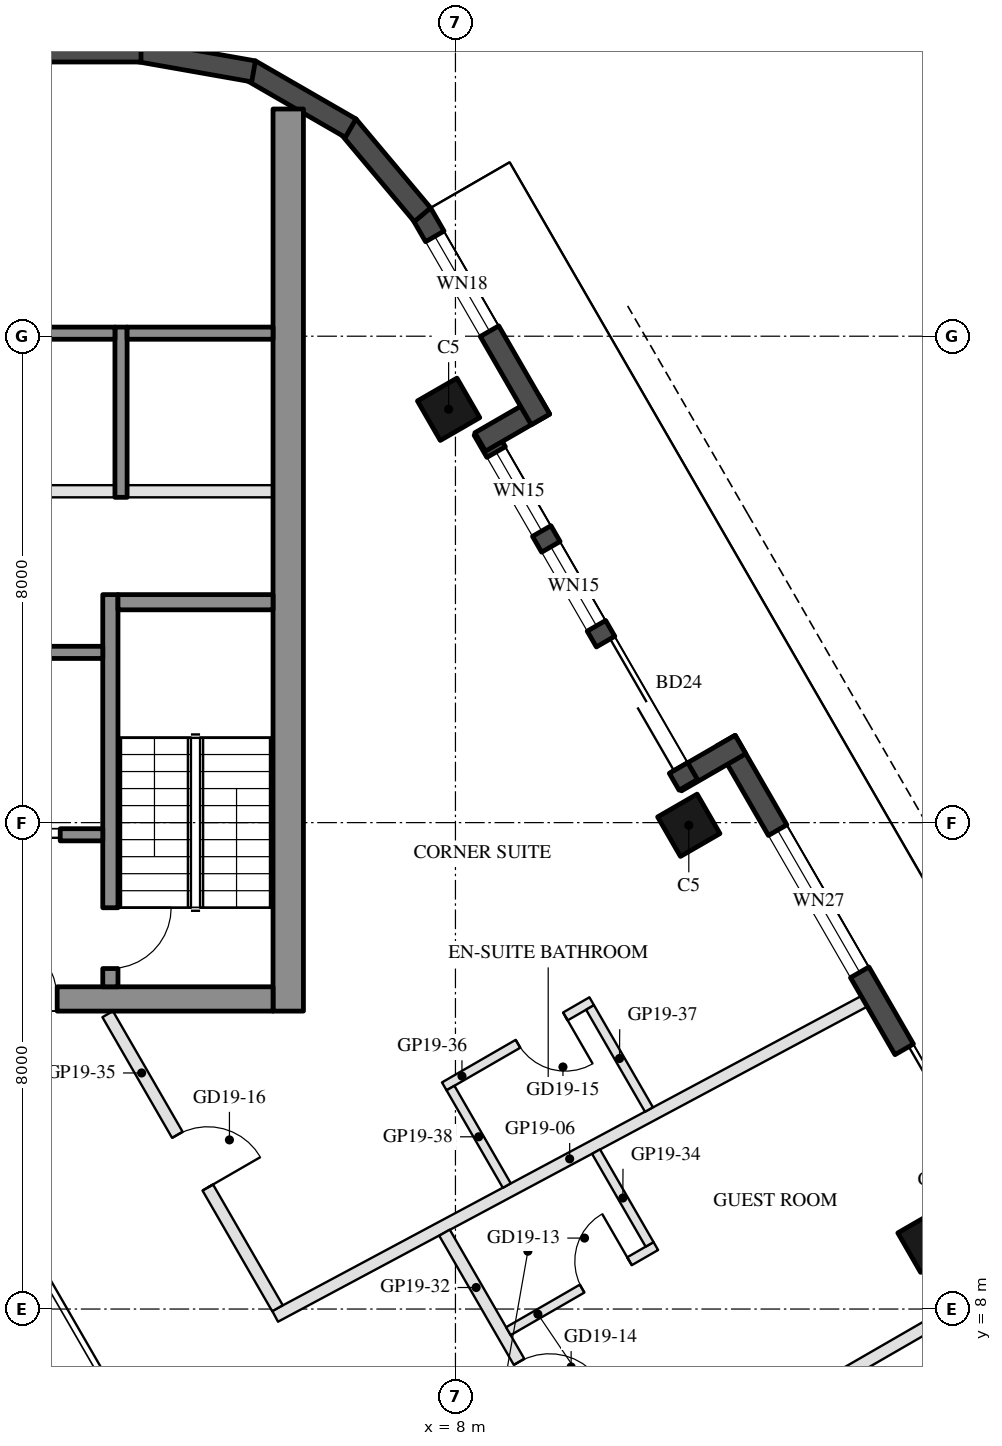
"""IFC4 building model, lengths in metres.
Left out: names, types, materials, properties, quantities, classifications, styles, units other than length and angle.
Written with IfcOpenShell. Run it as: python <this file> out.ifc"""

import sys

from ifc_helpers import new_model, si_unit, direction, frame, frame_2d, origin, origin_2d, place, context, subcontext, project, spatial, rectangle, hollow_rectangle, extrude, element, fill, save


model = new_model("IFC4")
c1 = context("Model", 3, precision=1e-05, world=origin(), true_north=direction((0.0, 1.0)))
c2 = subcontext(c1, "Body", "Model", "MODEL_VIEW")
j1 = project(units=[si_unit("LENGTHUNIT", "METRE"), si_unit("PLANEANGLEUNIT", "RADIAN")], contexts=[c1])
p1 = place(None, origin())
s1 = spatial("IfcSite", under=j1, at=p1, CompositionType="ELEMENT")
p2 = place(p1, origin())
s2 = spatial("IfcBuilding", under=s1, at=p2, CompositionType="ELEMENT")
p3 = place(p2, frame((0.0, 0.0, 202.1)))
s3 = spatial("IfcBuildingStorey", under=s2, at=p3, CompositionType="ELEMENT", Elevation=202.1)
for number, where, z_axis, x_axis in (
    (1, (15.788, 9.115, 0.0), (0.0, 0.0, 1.0), (-0.5, 0.866, 0.0)),
    (2, (11.838, 15.957, 0.0), (0.0, 0.0, 1.0), (-0.5, 0.866, 0.0)),
    (3, (7.888, 22.798, 0.0), (0.0, 0.0, 1.0), (-0.5, 0.866, 0.0)),
):
    element("IfcColumn", number, at=place(p3, frame(where, z_axis=z_axis, x_axis=x_axis)), inside=s3, PredefinedType="COLUMN", context=c2, shape_type="SweptSolid", body=[
        extrude(hollow_rectangle(XDim=0.75, YDim=0.75, WallThickness=0.035, at=origin_2d()), origin(), (0.0, 0.0, 1.0), 3.7),
    ])
p4 = place(p3, frame((17.299, 8.948, 0.0), z_axis=(0.0, 0.0, 1.0), x_axis=(-0.500010041276, 0.866019606374, 0.0)))
e4 = element("IfcWall", 4, at=p4, inside=s3, PredefinedType="SOLIDWALL", context=c2, shape_type="SweptSolid", body=[
    extrude(rectangle(XDim=9.7, YDim=0.35, at=frame_2d((4.85, 0.0))), origin(), (0.0, 0.0, 1.0), 3.55),
])
p5 = place(p4, frame((2.037, 0.0, 0.0)))
e5 = element("IfcOpeningElement", 5, at=p5, cuts=e4, PredefinedType="OPENING", context=c2, shape_type="SweptSolid", body=[
    extrude(rectangle(XDim=1.8, YDim=2.4, at=frame_2d((0.9, 1.2))), frame((0.0, 0.185, 0.0), z_axis=(0.0, -1.0, 0.0), x_axis=(1.0, 0.0, 0.0)), (0.0, 0.0, 1.0), 0.37),
])
p6 = place(p4, frame((5.3, 0.0, 0.3)))
e6 = element("IfcOpeningElement", 6, at=p6, cuts=e4, PredefinedType="OPENING", context=c2, shape_type="SweptSolid", body=[
    extrude(rectangle(XDim=2.7, YDim=2.65, at=frame_2d((1.35, 1.325))), frame((0.0, 0.185, 0.0), z_axis=(0.0, -1.0, 0.0), x_axis=(1.0, 0.0, 0.0)), (0.0, 0.0, 1.0), 0.37),
])
p7 = place(p3, frame((12.688, 17.284, 0.0), z_axis=(0.0, 0.0, 1.0), x_axis=(-0.865955602162, -0.500120880472, 0.0)))
e7 = element("IfcWall", 7, at=p7, inside=s3, PredefinedType="SOLIDWALL", context=c2, shape_type="SweptSolid", body=[
    extrude(rectangle(XDim=1.22, YDim=0.35, at=frame_2d((0.61, 0.0))), origin(), (0.0, 0.0, 1.0), 3.55),
])
p8 = place(p3, frame((11.829, 16.621, 0.0), z_axis=(0.0, 0.0, 1.0), x_axis=(-0.500003597184, 0.866023326939, 0.0)))
e8 = element("IfcWall", 8, at=p8, inside=s3, PredefinedType="SOLIDWALL", context=c2, shape_type="SweptSolid", body=[
    extrude(rectangle(XDim=6.74, YDim=0.35, at=frame_2d((3.37, 0.0))), origin(), (0.0, 0.0, 1.0), 3.55),
])
p9 = place(p8, frame((0.32, 0.0, 0.0)))
e9 = element("IfcOpeningElement", 9, at=p9, cuts=e8, PredefinedType="OPENING", context=c2, shape_type="SweptSolid", body=[
    extrude(rectangle(XDim=2.4, YDim=2.4, at=frame_2d((1.2, 1.2))), frame((0.0, 0.185, 0.0), z_axis=(0.0, -1.0, 0.0), x_axis=(1.0, 0.0, 0.0)), (0.0, 0.0, 1.0), 0.37),
])
p10 = place(p8, frame((3.02, 0.0, 0.3)))
e10 = element("IfcOpeningElement", 10, at=p10, cuts=e8, PredefinedType="OPENING", context=c2, shape_type="SweptSolid", body=[
    extrude(rectangle(XDim=1.5, YDim=2.65, at=frame_2d((0.75, 1.325))), frame((0.0, 0.185, 0.0), z_axis=(0.0, -1.0, 0.0), x_axis=(1.0, 0.0, 0.0)), (0.0, 0.0, 1.0), 0.37),
])
p11 = place(p8, frame((4.82, 0.0, 0.3)))
e11 = element("IfcOpeningElement", 11, at=p11, cuts=e8, PredefinedType="OPENING", context=c2, shape_type="SweptSolid", body=[
    extrude(rectangle(XDim=1.5, YDim=2.65, at=frame_2d((0.75, 1.325))), frame((0.0, 0.185, 0.0), z_axis=(0.0, -1.0, 0.0), x_axis=(1.0, 0.0, 0.0)), (0.0, 0.0, 1.0), 0.37),
])
p12 = place(p3, frame((8.406, 22.26, 0.0), z_axis=(0.0, 0.0, 1.0), x_axis=(0.865955602162, 0.500120880472, 0.0)))
e12 = element("IfcWall", 12, at=p12, inside=s3, PredefinedType="SOLIDWALL", context=c2, shape_type="SweptSolid", body=[
    extrude(rectangle(XDim=1.22, YDim=0.35, at=frame_2d((0.61, 0.0))), origin(), (0.0, 0.0, 1.0), 3.55),
])
p13 = place(p3, frame((9.398, 22.631, 0.0), z_axis=(0.0, 0.0, 1.0), x_axis=(-0.499954521343, 0.866051659307, 0.0)))
e13 = element("IfcWall", 13, at=p13, inside=s3, PredefinedType="SOLIDWALL", context=c2, shape_type="SweptSolid", body=[
    extrude(rectangle(XDim=3.916, YDim=0.35, at=frame_2d((1.958, 0.0))), origin(), (0.0, 0.0, 1.0), 3.55),
])
p14 = place(p13, frame((1.676, 0.0, 0.3)))
e14 = element("IfcOpeningElement", 14, at=p14, cuts=e13, PredefinedType="OPENING", context=c2, shape_type="SweptSolid", body=[
    extrude(rectangle(XDim=1.8, YDim=2.65, at=frame_2d((0.9, 1.325))), frame((0.0, 0.185, 0.0), z_axis=(0.0, -1.0, 0.0), x_axis=(1.0, 0.0, 0.0)), (0.0, 0.0, 1.0), 0.37),
])
p15 = place(p3, frame((7.458, 25.998, 0.0), z_axis=(0.0, 0.0, 1.0), x_axis=(-0.642808304945, 0.766027077259, 0.0)))
e15 = element("IfcWall", 15, at=p15, inside=s3, PredefinedType="SOLIDWALL", context=c2, shape_type="SweptSolid", body=[
    extrude(rectangle(XDim=1.91, YDim=0.35, at=frame_2d((0.955, 0.0))), origin(), (0.0, 0.0, 1.0), 3.55),
])
for number, where, z_axis, x_axis in (
    (16, (6.277, 27.422, 0.0), (0.0, 0.0, 1.0), (-0.866, 0.5, 0.0)),
    (17, (4.68, 28.356, 0.0), (0.0, 0.0, 1.0), (-0.985, 0.174, 0.0)),
):
    element("IfcWall", number, at=place(p3, frame(where, z_axis=z_axis, x_axis=x_axis)), inside=s3, PredefinedType="SOLIDWALL", context=c2, shape_type="SweptSolid", body=[
        extrude(rectangle(XDim=1.91, YDim=0.35, at=frame_2d((0.955, 0.0))), origin(), (0.0, 0.0, 1.0), 3.55),
    ])
p16 = place(p3, frame((2.829, 28.685, 0.0), z_axis=(0.0, 0.0, 1.0), x_axis=(-1.0, 0.0, 0.0)))
e18 = element("IfcWall", 18, at=p16, inside=s3, PredefinedType="SOLIDWALL", context=c2, shape_type="SweptSolid", body=[
    extrude(rectangle(XDim=5.658, YDim=0.35, at=frame_2d((2.829, 0.0))), origin(), (0.0, 0.0, 1.0), 3.55),
])
p17 = place(p3, frame((5.25, 12.9, 0.0), z_axis=(0.0, 0.0, 1.0), x_axis=(0.0, 1.0, 0.0)))
e19 = element("IfcWall", 19, at=p17, inside=s3, PredefinedType="SHEAR", context=c2, shape_type="SweptSolid", body=[
    extrude(rectangle(XDim=14.837, YDim=0.5, at=frame_2d((7.418, 0.0))), origin(), (0.0, 0.0, 1.0), 3.5),
])
p18 = place(p3, frame((5.0, 13.1, 0.0), z_axis=(0.0, 0.0, 1.0), x_axis=(-1.0, 0.0, 0.0)))
e20 = element("IfcWall", 20, at=p18, inside=s3, PredefinedType="SHEAR", context=c2, shape_type="SweptSolid", body=[
    extrude(rectangle(XDim=10.0, YDim=0.4, at=frame_2d((5.0, 0.0))), origin(), (0.0, 0.0, 1.0), 3.5),
])
p19 = place(p18, frame((3.55, 0.0, 0.0)))
e21 = element("IfcOpeningElement", 21, at=p19, cuts=e20, PredefinedType="OPENING", context=c2, shape_type="SweptSolid", body=[
    extrude(rectangle(XDim=1.1, YDim=2.1, at=frame_2d((0.55, 1.05))), frame((0.0, 0.21, 0.0), z_axis=(0.0, -1.0, 0.0), x_axis=(1.0, 0.0, 0.0)), (0.0, 0.0, 1.0), 0.42),
])
p20 = place(p18, frame((5.85, 0.0, 0.0)))
e22 = element("IfcOpeningElement", 22, at=p20, cuts=e20, PredefinedType="OPENING", context=c2, shape_type="SweptSolid", body=[
    extrude(rectangle(XDim=1.4, YDim=2.1, at=frame_2d((0.7, 1.05))), frame((0.0, 0.21, 0.0), z_axis=(0.0, -1.0, 0.0), x_axis=(1.0, 0.0, 0.0)), (0.0, 0.0, 1.0), 0.42),
])
p21 = place(p3, frame((2.325, 13.3, 0.0), z_axis=(0.0, 0.0, 1.0), x_axis=(0.0, 1.0, 0.0)))
e23 = element("IfcWall", 23, at=p21, inside=s3, PredefinedType="SHEAR", context=c2, shape_type="SweptSolid", body=[
    extrude(rectangle(XDim=6.45, YDim=0.25, at=frame_2d((3.225, 0.0))), origin(), (0.0, 0.0, 1.0), 3.5),
])
p22 = place(p21, frame((0.3, 0.0, 0.0)))
e24 = element("IfcOpeningElement", 24, at=p22, cuts=e23, PredefinedType="OPENING", context=c2, shape_type="SweptSolid", body=[
    extrude(rectangle(XDim=1.0, YDim=2.1, at=frame_2d((0.5, 1.05))), frame((0.0, 0.135, 0.0), z_axis=(0.0, -1.0, 0.0), x_axis=(1.0, 0.0, 0.0)), (0.0, 0.0, 1.0), 0.27),
])
p23 = place(p3, frame((5.0, 19.625, 0.0), z_axis=(0.0, 0.0, 1.0), x_axis=(-1.0, 0.0, 0.0)))
e25 = element("IfcWall", 25, at=p23, inside=s3, PredefinedType="SHEAR", context=c2, shape_type="SweptSolid", body=[
    extrude(rectangle(XDim=2.55, YDim=0.25, at=frame_2d((1.275, 0.0))), origin(), (0.0, 0.0, 1.0), 3.5),
])
p24 = place(p3, frame((2.2, 18.8, 0.0), z_axis=(0.0, 0.0, 1.0), x_axis=(-1.0, 0.0, 0.0)))
e26 = element("IfcWall", 26, at=p24, inside=s3, PredefinedType="SHEAR", context=c2, shape_type="SweptSolid", body=[
    extrude(rectangle(XDim=2.8, YDim=0.2, at=frame_2d((1.4, 0.0))), origin(), (0.0, 0.0, 1.0), 3.5),
])
p25 = place(p3, frame((2.2, 15.8, 0.0), z_axis=(0.0, 0.0, 1.0), x_axis=(-1.0, 0.0, 0.0)))
e27 = element("IfcWall", 27, at=p25, inside=s3, PredefinedType="SHEAR", context=c2, shape_type="SweptSolid", body=[
    extrude(rectangle(XDim=2.8, YDim=0.2, at=frame_2d((1.4, 0.0))), origin(), (0.0, 0.0, 1.0), 3.5),
])
p26 = place(p25, frame((0.7, 0.0, 0.0)))
e28 = element("IfcOpeningElement", 28, at=p26, cuts=e27, PredefinedType="OPENING", context=c2, shape_type="SweptSolid", body=[
    extrude(rectangle(XDim=1.2, YDim=2.1, at=frame_2d((0.6, 1.05))), frame((0.0, 0.11, 0.0), z_axis=(0.0, -1.0, 0.0), x_axis=(1.0, 0.0, 0.0)), (0.0, 0.0, 1.0), 0.22),
])
p27 = place(p3, frame((2.5, 21.35, 0.0), z_axis=(0.0, 0.0, 1.0), x_axis=(0.0, 1.0, 0.0)))
e29 = element("IfcWall", 29, at=p27, inside=s3, PredefinedType="SHEAR", context=c2, shape_type="SweptSolid", body=[
    extrude(rectangle(XDim=2.8, YDim=0.2, at=frame_2d((1.4, 0.0))), origin(), (0.0, 0.0, 1.0), 3.5),
])
p28 = place(p3, frame((5.0, 24.05, 0.0), z_axis=(0.0, 0.0, 1.0), x_axis=(-1.0, 0.0, 0.0)))
e30 = element("IfcWall", 30, at=p28, inside=s3, PredefinedType="SHEAR", context=c2, shape_type="SweptSolid", body=[
    extrude(rectangle(XDim=2.4, YDim=0.2, at=frame_2d((1.2, 0.0))), origin(), (0.0, 0.0, 1.0), 3.5),
])
p29 = place(p3, frame((2.4, 24.05, 0.0), z_axis=(0.0, 0.0, 1.0), x_axis=(-1.0, 0.0, 0.0)))
e31 = element("IfcWall", 31, at=p29, inside=s3, PredefinedType="SHEAR", context=c2, shape_type="SweptSolid", body=[
    extrude(rectangle(XDim=2.8, YDim=0.2, at=frame_2d((1.4, 0.0))), origin(), (0.0, 0.0, 1.0), 3.5),
])
p30 = place(p3, frame((5.0, 21.45, 0.0), z_axis=(0.0, 0.0, 1.0), x_axis=(-1.0, 0.0, 0.0)))
e32 = element("IfcWall", 32, at=p30, inside=s3, PredefinedType="PARTITIONING", context=c2, shape_type="SweptSolid", body=[
    extrude(rectangle(XDim=2.4, YDim=0.2, at=frame_2d((1.2, 0.0))), origin(), (0.0, 0.0, 1.0), 3.5),
])
p31 = place(p3, frame((2.4, 21.45, 0.0), z_axis=(0.0, 0.0, 1.0), x_axis=(-1.0, 0.0, 0.0)))
e33 = element("IfcWall", 33, at=p31, inside=s3, PredefinedType="PARTITIONING", context=c2, shape_type="SweptSolid", body=[
    extrude(rectangle(XDim=2.8, YDim=0.2, at=frame_2d((1.4, 0.0))), origin(), (0.0, 0.0, 1.0), 3.5),
])
p32 = place(p3, frame((16.518, 8.151, 0.0), z_axis=(0.0, 0.0, 1.0), x_axis=(-0.866027673501, -0.499996068715, 0.0)))
e34 = element("IfcWall", 34, at=p32, inside=s3, PredefinedType="PARTITIONING", context=c2, shape_type="SweptSolid", body=[
    extrude(rectangle(XDim=7.08, YDim=0.2, at=frame_2d((3.54, 0.0))), origin(), (0.0, 0.0, 1.0), 3.06),
])
p33 = place(p3, frame((14.722, 13.061, 0.0), z_axis=(0.0, 0.0, 1.0), x_axis=(-0.881785716662, -0.471650241059, 0.0)))
e35 = element("IfcWall", 35, at=p33, inside=s3, PredefinedType="PARTITIONING", context=c2, shape_type="SweptSolid", body=[
    extrude(rectangle(XDim=10.986, YDim=0.2, at=frame_2d((5.493, 0.0))), origin(), (0.0, 0.0, 1.0), 2.95),
])
p34 = place(p3, frame((7.82, 9.256, 0.0), z_axis=(0.0, 0.0, 1.0), x_axis=(0.499987686533, -0.866032512851, 0.0)))
e36 = element("IfcWall", 36, at=p34, inside=s3, PredefinedType="PARTITIONING", context=c2, shape_type="SweptSolid", body=[
    extrude(rectangle(XDim=5.206, YDim=0.2, at=frame_2d((2.603, 0.0))), origin(), (0.0, 0.0, 1.0), 2.95),
])
p35 = place(p34, frame((2.453, 0.0, 0.0)))
e37 = element("IfcOpeningElement", 37, at=p35, cuts=e36, PredefinedType="OPENING", context=c2, shape_type="SweptSolid", body=[
    extrude(rectangle(XDim=1.0, YDim=2.1, at=frame_2d((0.5, 1.05))), frame((0.0, 0.11, 0.0), z_axis=(0.0, -1.0, 0.0), x_axis=(1.0, 0.0, 0.0)), (0.0, 0.0, 1.0), 0.22),
])
p36 = place(p3, frame((8.871, 7.636, 0.0), z_axis=(0.0, 0.0, 1.0), x_axis=(0.865996816683, 0.500049511043, 0.0)))
e38 = element("IfcWall", 38, at=p36, inside=s3, PredefinedType="PARTITIONING", context=c2, shape_type="SweptSolid", body=[
    extrude(rectangle(XDim=2.8, YDim=0.15, at=frame_2d((1.4, 0.0))), origin(), (0.0, 0.0, 1.0), 3.55),
])
p37 = place(p36, frame((1.4, 0.0, 0.0)))
e39 = element("IfcOpeningElement", 39, at=p37, cuts=e38, PredefinedType="OPENING", context=c2, shape_type="SweptSolid", body=[
    extrude(rectangle(XDim=0.9, YDim=2.1, at=frame_2d((0.45, 1.05))), frame((0.0, 0.085, 0.0), z_axis=(0.0, -1.0, 0.0), x_axis=(1.0, 0.0, 0.0)), (0.0, 0.0, 1.0), 0.17),
])
p38 = place(p3, frame((11.193, 9.063, 0.0), z_axis=(0.0, 0.0, 1.0), x_axis=(-0.499910413417, 0.866077120444, 0.0)))
e40 = element("IfcWall", 40, at=p38, inside=s3, PredefinedType="PARTITIONING", context=c2, shape_type="SweptSolid", body=[
    extrude(rectangle(XDim=1.761, YDim=0.15, at=frame_2d((0.881, 0.0))), origin(), (0.0, 0.0, 1.0), 2.95),
])
p39 = place(p3, frame((2.281, 12.85, 0.0), z_axis=(0.0, 0.0, 1.0), x_axis=(0.500003731568, -0.866023249352, 0.0)))
e41 = element("IfcWall", 41, at=p39, inside=s3, PredefinedType="PARTITIONING", context=c2, shape_type="SweptSolid", body=[
    extrude(rectangle(XDim=5.585, YDim=0.2, at=frame_2d((2.792, 0.0))), origin(), (0.0, 0.0, 1.0), 2.95),
])
p40 = place(p39, frame((2.292, 0.0, 0.0)))
e42 = element("IfcOpeningElement", 42, at=p40, cuts=e41, PredefinedType="OPENING", context=c2, shape_type="SweptSolid", body=[
    extrude(rectangle(XDim=1.0, YDim=2.1, at=frame_2d((0.5, 1.05))), frame((0.0, 0.11, 0.0), z_axis=(0.0, -1.0, 0.0), x_axis=(1.0, 0.0, 0.0)), (0.0, 0.0, 1.0), 0.22),
])
p41 = place(p3, frame((10.241, 13.062, 0.0), z_axis=(0.0, 0.0, 1.0), x_axis=(-0.865996816683, -0.500049511043, 0.0)))
e43 = element("IfcWall", 43, at=p41, inside=s3, PredefinedType="PARTITIONING", context=c2, shape_type="SweptSolid", body=[
    extrude(rectangle(XDim=2.8, YDim=0.15, at=frame_2d((1.4, 0.0))), origin(), (0.0, 0.0, 1.0), 3.55),
])
p42 = place(p41, frame((0.5, 0.0, 0.0)))
e44 = element("IfcOpeningElement", 44, at=p42, cuts=e43, PredefinedType="OPENING", context=c2, shape_type="SweptSolid", body=[
    extrude(rectangle(XDim=0.9, YDim=2.1, at=frame_2d((0.45, 1.05))), frame((0.0, 0.085, 0.0), z_axis=(0.0, -1.0, 0.0), x_axis=(1.0, 0.0, 0.0)), (0.0, 0.0, 1.0), 0.17),
])
p43 = place(p3, frame((11.183, 11.281, 0.0), z_axis=(0.0, 0.0, 1.0), x_axis=(-0.500013181875, 0.866017793092, 0.0)))
e45 = element("IfcWall", 45, at=p43, inside=s3, PredefinedType="PARTITIONING", context=c2, shape_type="SweptSolid", body=[
    extrude(rectangle(XDim=1.938, YDim=0.15, at=frame_2d((0.969, 0.0))), origin(), (0.0, 0.0, 1.0), 3.55),
])
p44 = place(p3, frame((8.844, 10.031, 0.0), z_axis=(0.0, 0.0, 1.0), x_axis=(-0.499924019097, 0.866069266935, 0.0)))
e46 = element("IfcWall", 46, at=p44, inside=s3, PredefinedType="PARTITIONING", context=c2, shape_type="SweptSolid", body=[
    extrude(rectangle(XDim=1.852, YDim=0.15, at=frame_2d((0.926, 0.0))), origin(), (0.0, 0.0, 1.0), 3.55),
])
p45 = place(p5, frame((1.8, 0.0, 0.0), z_axis=(0.0, 0.0, 1.0), x_axis=(-1.0, 0.0, 0.0)))
e47 = element("IfcDoor", 47, at=p45, inside=s3, OperationType="SLIDING_TO_LEFT", PredefinedType="DOOR", context=c2, shape_type="SweptSolid", body=[
    extrude(rectangle(XDim=1.8, YDim=2.4, at=frame_2d((0.9, 1.2))), frame((0.0, 0.025, 0.0), z_axis=(0.0, -1.0, 0.0), x_axis=(1.0, 0.0, 0.0)), (0.0, 0.0, 1.0), 0.05),
])
fill(e5, e47)
p46 = place(p6, origin())
e48 = element("IfcWindow", 48, at=p46, inside=s3, PartitioningType="SINGLE_PANEL", PredefinedType="WINDOW", context=c2, shape_type="SweptSolid", body=[
    extrude(rectangle(XDim=2.7, YDim=2.65, at=frame_2d((1.35, 1.325))), frame((0.0, 0.03, 0.0), z_axis=(0.0, -1.0, 0.0), x_axis=(1.0, 0.0, 0.0)), (0.0, 0.0, 1.0), 0.06),
])
fill(e6, e48)
p47 = place(p9, frame((2.4, 0.0, 0.0), z_axis=(0.0, 0.0, 1.0), x_axis=(-1.0, 0.0, 0.0)))
e49 = element("IfcDoor", 49, at=p47, inside=s3, OperationType="SLIDING_TO_LEFT", PredefinedType="DOOR", context=c2, shape_type="SweptSolid", body=[
    extrude(rectangle(XDim=2.4, YDim=2.4, at=frame_2d((1.2, 1.2))), frame((0.0, 0.025, 0.0), z_axis=(0.0, -1.0, 0.0), x_axis=(1.0, 0.0, 0.0)), (0.0, 0.0, 1.0), 0.05),
])
fill(e9, e49)
p48 = place(p10, origin())
e50 = element("IfcWindow", 50, at=p48, inside=s3, PartitioningType="SINGLE_PANEL", PredefinedType="WINDOW", context=c2, shape_type="SweptSolid", body=[
    extrude(rectangle(XDim=1.5, YDim=2.65, at=frame_2d((0.75, 1.325))), frame((0.0, 0.03, 0.0), z_axis=(0.0, -1.0, 0.0), x_axis=(1.0, 0.0, 0.0)), (0.0, 0.0, 1.0), 0.06),
])
fill(e10, e50)
p49 = place(p11, origin())
e51 = element("IfcWindow", 51, at=p49, inside=s3, PartitioningType="SINGLE_PANEL", PredefinedType="WINDOW", context=c2, shape_type="SweptSolid", body=[
    extrude(rectangle(XDim=1.5, YDim=2.65, at=frame_2d((0.75, 1.325))), frame((0.0, 0.03, 0.0), z_axis=(0.0, -1.0, 0.0), x_axis=(1.0, 0.0, 0.0)), (0.0, 0.0, 1.0), 0.06),
])
fill(e11, e51)
p50 = place(p14, origin())
e52 = element("IfcWindow", 52, at=p50, inside=s3, PartitioningType="SINGLE_PANEL", PredefinedType="WINDOW", context=c2, shape_type="SweptSolid", body=[
    extrude(rectangle(XDim=1.8, YDim=2.65, at=frame_2d((0.9, 1.325))), frame((0.0, 0.03, 0.0), z_axis=(0.0, -1.0, 0.0), x_axis=(1.0, 0.0, 0.0)), (0.0, 0.0, 1.0), 0.06),
])
fill(e14, e52)
p51 = place(p26, origin())
e53 = element("IfcDoor", 53, at=p51, inside=s3, OperationType="DOUBLE_DOOR_SLIDING", PredefinedType="DOOR", context=c2, shape_type="SweptSolid", body=[
    extrude(rectangle(XDim=1.2, YDim=2.1, at=frame_2d((0.6, 1.05))), frame((0.0, 0.025, 0.0), z_axis=(0.0, -1.0, 0.0), x_axis=(1.0, 0.0, 0.0)), (0.0, 0.0, 1.0), 0.05),
])
fill(e28, e53)
p52 = place(p19, frame((1.1, 0.0, 0.0), z_axis=(0.0, 0.0, 1.0), x_axis=(-1.0, 0.0, 0.0)))
e54 = element("IfcDoor", 54, at=p52, inside=s3, OperationType="SINGLE_SWING_LEFT", PredefinedType="DOOR", context=c2, shape_type="SweptSolid", body=[
    extrude(rectangle(XDim=1.1, YDim=2.1, at=frame_2d((0.55, 1.05))), frame((0.0, 0.025, 0.0), z_axis=(0.0, -1.0, 0.0), x_axis=(1.0, 0.0, 0.0)), (0.0, 0.0, 1.0), 0.05),
])
fill(e21, e54)
p53 = place(p22, frame((1.0, 0.0, 0.0), z_axis=(0.0, 0.0, 1.0), x_axis=(-1.0, 0.0, 0.0)))
e55 = element("IfcDoor", 55, at=p53, inside=s3, OperationType="SINGLE_SWING_LEFT", PredefinedType="DOOR", context=c2, shape_type="SweptSolid", body=[
    extrude(rectangle(XDim=1.0, YDim=2.1, at=frame_2d((0.5, 1.05))), frame((0.0, 0.025, 0.0), z_axis=(0.0, -1.0, 0.0), x_axis=(1.0, 0.0, 0.0)), (0.0, 0.0, 1.0), 0.05),
])
fill(e24, e55)
p54 = place(p37, origin())
e56 = element("IfcDoor", 56, at=p54, inside=s3, OperationType="SINGLE_SWING_RIGHT", PredefinedType="DOOR", context=c2, shape_type="SweptSolid", body=[
    extrude(rectangle(XDim=0.9, YDim=2.1, at=frame_2d((0.45, 1.05))), frame((0.0, 0.025, 0.0), z_axis=(0.0, -1.0, 0.0), x_axis=(1.0, 0.0, 0.0)), (0.0, 0.0, 1.0), 0.05),
])
fill(e39, e56)
p55 = place(p35, origin())
e57 = element("IfcDoor", 57, at=p55, inside=s3, OperationType="SINGLE_SWING_RIGHT", PredefinedType="DOOR", context=c2, shape_type="SweptSolid", body=[
    extrude(rectangle(XDim=1.0, YDim=2.1, at=frame_2d((0.5, 1.05))), frame((0.0, 0.025, 0.0), z_axis=(0.0, -1.0, 0.0), x_axis=(1.0, 0.0, 0.0)), (0.0, 0.0, 1.0), 0.05),
])
fill(e37, e57)
p56 = place(p42, origin())
e58 = element("IfcDoor", 58, at=p56, inside=s3, OperationType="SINGLE_SWING_LEFT", PredefinedType="DOOR", context=c2, shape_type="SweptSolid", body=[
    extrude(rectangle(XDim=0.9, YDim=2.1, at=frame_2d((0.45, 1.05))), frame((0.0, 0.025, 0.0), z_axis=(0.0, -1.0, 0.0), x_axis=(1.0, 0.0, 0.0)), (0.0, 0.0, 1.0), 0.05),
])
fill(e44, e58)
p57 = place(p40, origin())
e59 = element("IfcDoor", 59, at=p57, inside=s3, OperationType="SINGLE_SWING_RIGHT", PredefinedType="DOOR", context=c2, shape_type="SweptSolid", body=[
    extrude(rectangle(XDim=1.0, YDim=2.1, at=frame_2d((0.5, 1.05))), frame((0.0, 0.025, 0.0), z_axis=(0.0, -1.0, 0.0), x_axis=(1.0, 0.0, 0.0)), (0.0, 0.0, 1.0), 0.05),
])
fill(e42, e59)
save(model, sys.argv[1])
